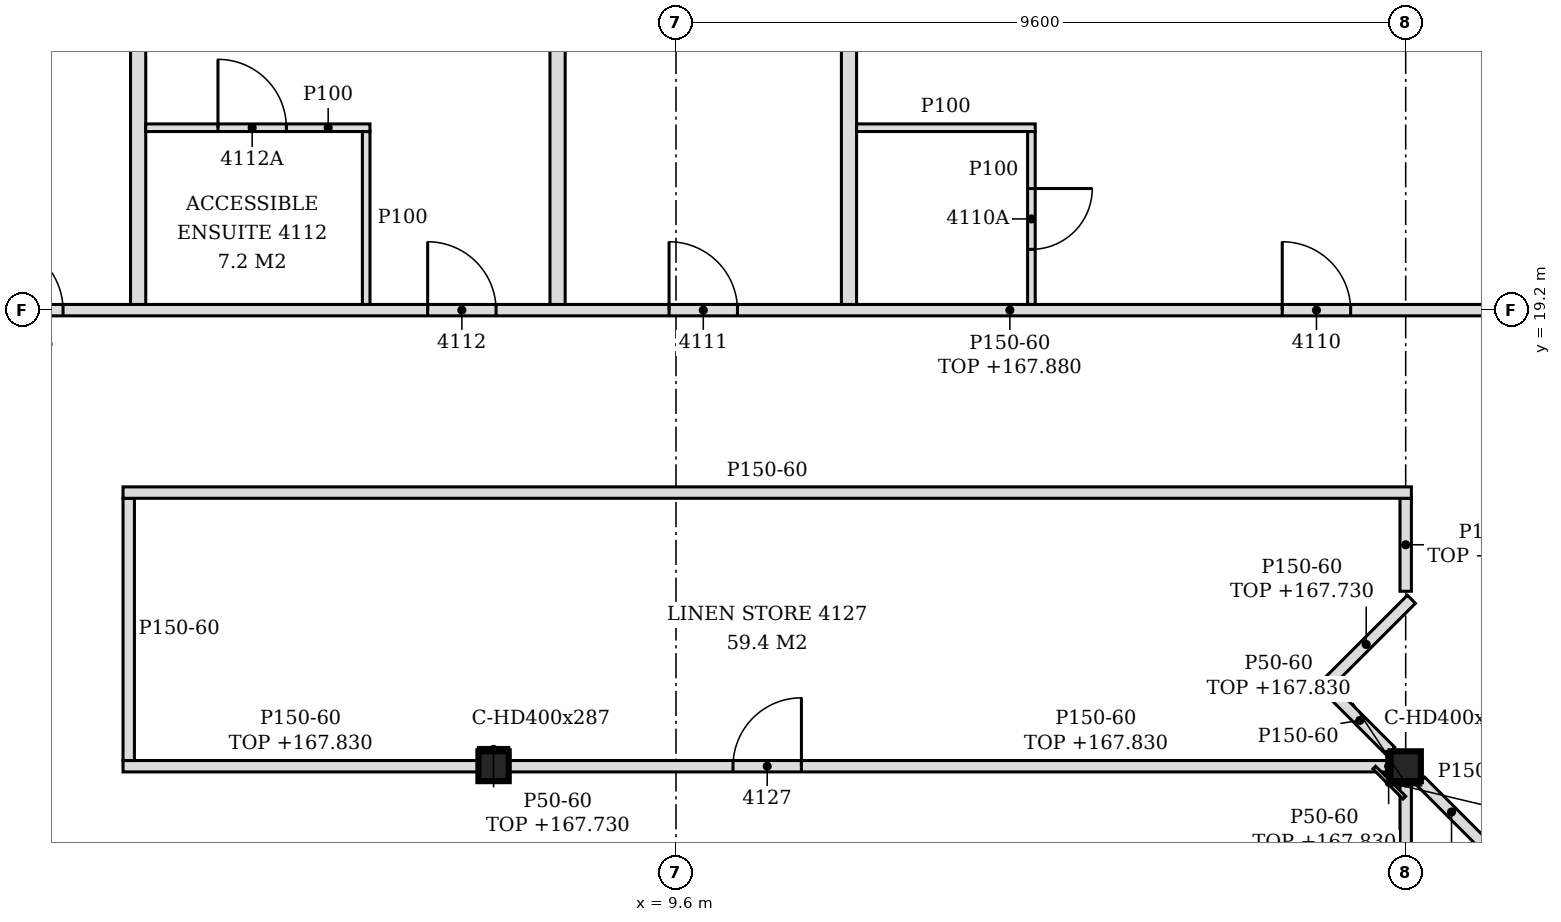
"""IFC4 building model, lengths in metres.
Left out: names, types, materials, properties, quantities, classifications, styles, units other than length and angle.
Written with IfcOpenShell. Run it as: python <this file> out.ifc"""

import sys

from ifc_helpers import new_model, si_unit, direction, frame, frame_2d, origin, origin_2d, place, context, subcontext, project, spatial, polyline, rectangle, i_section, outline, extrude, element, fill, save


model = new_model("IFC4")
c1 = context("Model", 3, precision=1e-05, world=origin(), true_north=direction((0.0, 1.0)))
c2 = subcontext(c1, "Body", "Model", "MODEL_VIEW")
j1 = project(units=[si_unit("LENGTHUNIT", "METRE"), si_unit("PLANEANGLEUNIT", "RADIAN")], contexts=[c1])
p1 = place(None, origin())
s1 = spatial("IfcSite", under=j1, at=p1, CompositionType="ELEMENT")
p2 = place(p1, origin())
s2 = spatial("IfcBuilding", under=s1, at=p2, CompositionType="ELEMENT")
p3 = place(p2, frame((0.0, 0.0, 165.0)))
s3 = spatial("IfcBuildingStorey", under=s2, at=p3, CompositionType="ELEMENT", Elevation=165.0)
for number, where, z_axis, x_axis in (
    (1, (7.2, 13.2, -0.15), (0.0, 0.0, 1.0), (1.0, 0.0, 0.0)),
    (2, (19.2, 13.2, -0.15), (0.0, 0.0, 1.0), (1.0, 0.0, 0.0)),
):
    element("IfcColumn", number, at=place(p3, frame(where, z_axis=z_axis, x_axis=x_axis)), inside=s3, PredefinedType="COLUMN", context=c2, shape_type="SweptSolid", body=[
        extrude(i_section(OverallWidth=0.399, OverallDepth=0.393, WebThickness=0.023, FlangeThickness=0.037, FilletRadius=0.015, at=origin_2d()), origin(), (0.0, 0.0, 1.0), 3.6),
    ])
p4 = place(p3, frame((19.2, 2.596, 0.0), z_axis=(0.0, 0.0, 1.0), x_axis=(0.0, 1.0, 0.0)))
e3 = element("IfcWall", 3, at=p4, inside=s3, PredefinedType="PARTITIONING", context=c2, shape_type="SweptSolid", body=[
    extrude(rectangle(XDim=10.407, YDim=0.15, at=frame_2d((5.204, 0.0))), origin(), (0.0, 0.0, 1.0), 2.83),
])
p5 = place(p4, frame((0.553, 0.0, 0.0)))
e4 = element("IfcOpeningElement", 4, at=p5, cuts=e3, PredefinedType="OPENING", context=c2, shape_type="SweptSolid", body=[
    extrude(rectangle(XDim=0.9, YDim=2.1, at=frame_2d((0.45, 1.05))), frame((0.0, 0.085, 0.0), z_axis=(0.0, -1.0, 0.0), x_axis=(1.0, 0.0, 0.0)), (0.0, 0.0, 1.0), 0.17),
])
p6 = place(p3, frame((20.208, 12.086, 0.0), z_axis=(0.0, 0.0, 1.0), x_axis=(0.706756381459, 0.707457007363, 0.0)))
e5 = element("IfcWall", 5, at=p6, inside=s3, PredefinedType="PARTITIONING", context=c2, shape_type="SweptSolid", body=[
    extrude(rectangle(XDim=1.394, YDim=0.15, at=frame_2d((0.697, 0.0))), origin(), (0.0, 0.0, 1.0), 3.45),
])
p7 = place(p3, frame((20.208, 12.192, 0.0), z_axis=(0.0, 0.0, 1.0), x_axis=(-0.70721334539, 0.707000200921, 0.0)))
e6 = element("IfcWall", 6, at=p7, inside=s3, PredefinedType="PARTITIONING", context=c2, shape_type="SweptSolid", body=[
    extrude(rectangle(XDim=1.146, YDim=0.15, at=frame_2d((0.573, 0.0))), origin(), (0.0, 0.0, 1.0), 3.45),
])
p8 = place(p3, frame((2.325, 13.2, 0.0), z_axis=(0.0, 0.0, 1.0), x_axis=(1.0, 0.0, 0.0)))
e7 = element("IfcWall", 7, at=p8, inside=s3, PredefinedType="PARTITIONING", context=c2, shape_type="SweptSolid", body=[
    extrude(rectangle(XDim=4.676, YDim=0.15, at=frame_2d((2.338, 0.0))), origin(), (0.0, 0.0, 1.0), 2.83),
])
p9 = place(p3, frame((7.399, 13.2, 0.0), z_axis=(0.0, 0.0, 1.0), x_axis=(1.0, 0.0, 0.0)))
e8 = element("IfcWall", 8, at=p9, inside=s3, PredefinedType="PARTITIONING", context=c2, shape_type="SweptSolid", body=[
    extrude(rectangle(XDim=11.601, YDim=0.15, at=frame_2d((5.801, 0.0))), origin(), (0.0, 0.0, 1.0), 2.83),
])
p10 = place(p9, frame((2.95, 0.0, 0.0)))
e9 = element("IfcOpeningElement", 9, at=p10, cuts=e8, PredefinedType="OPENING", context=c2, shape_type="SweptSolid", body=[
    extrude(rectangle(XDim=0.9, YDim=2.1, at=frame_2d((0.45, 1.05))), frame((0.0, 0.085, 0.0), z_axis=(0.0, -1.0, 0.0), x_axis=(1.0, 0.0, 0.0)), (0.0, 0.0, 1.0), 0.17),
])
p11 = place(p3, frame((2.4, 13.275, 0.0), z_axis=(0.0, 0.0, 1.0), x_axis=(0.0, 1.0, 0.0)))
e10 = element("IfcWall", 10, at=p11, inside=s3, PredefinedType="PARTITIONING", context=c2, shape_type="SweptSolid", body=[
    extrude(outline(polyline([(0.0, 0.0), (3.45, 0.0), (3.45, 3.45), (0.075, 3.45), (0.073, 2.83), (0.0, 2.83), (0.0, 0.0)])), frame((0.0, 0.075, 0.0), z_axis=(0.0, -1.0, 0.0), x_axis=(1.0, 0.0, 0.0)), (0.0, 0.0, 1.0), 0.15),
])
p12 = place(p3, frame((19.002, 13.398, 0.0), z_axis=(0.0, 0.0, 1.0), x_axis=(-0.707000200921, 0.70721334539, 0.0)))
e11 = element("IfcWall", 11, at=p12, inside=s3, PredefinedType="PARTITIONING", context=c2, shape_type="SweptSolid", body=[
    extrude(rectangle(XDim=1.146, YDim=0.15, at=frame_2d((0.573, 0.0))), origin(), (0.0, 0.0, 1.0), 3.45),
])
p13 = place(p3, frame((18.086, 14.208, 0.0), z_axis=(0.0, 0.0, 1.0), x_axis=(0.70739723372, 0.706816209298, 0.0)))
e12 = element("IfcWall", 12, at=p13, inside=s3, PredefinedType="PARTITIONING", context=c2, shape_type="SweptSolid", body=[
    extrude(rectangle(XDim=1.681, YDim=0.15, at=frame_2d((0.84, 0.0))), origin(), (0.0, 0.0, 1.0), 2.73),
])
p14 = place(p3, frame((19.2, 15.502, 0.0), z_axis=(0.0, 0.0, 1.0), x_axis=(0.0, 1.0, 0.0)))
e13 = element("IfcWall", 13, at=p14, inside=s3, PredefinedType="PARTITIONING", context=c2, shape_type="SweptSolid", body=[
    extrude(rectangle(XDim=1.223, YDim=0.15, at=frame_2d((0.612, 0.0))), origin(), (0.0, 0.0, 1.0), 2.73),
])
p15 = place(p3, frame((2.325, 16.8, 0.0), z_axis=(0.0, 0.0, 1.0), x_axis=(1.0, 0.0, 0.0)))
e14 = element("IfcWall", 14, at=p15, inside=s3, PredefinedType="PARTITIONING", context=c2, shape_type="SweptSolid", body=[
    extrude(outline(polyline([(0.0, 0.0), (16.95, 0.0), (16.95, 2.73), (16.725, 2.73), (16.723, 3.45), (5.025, 3.45), (5.023, 2.73), (4.725, 2.73), (4.723, 3.45), (0.0, 3.45), (0.0, 0.0)])), frame((0.0, 0.075, 0.0), z_axis=(0.0, -1.0, 0.0), x_axis=(1.0, 0.0, 0.0)), (0.0, 0.0, 1.0), 0.15),
])
p16 = place(p3, frame((-8.421, 19.2, 0.0), z_axis=(0.0, 0.0, 1.0), x_axis=(1.0, 0.0, 0.0)))
e15 = element("IfcWall", 15, at=p16, inside=s3, PredefinedType="PARTITIONING", context=c2, shape_type="SweptSolid", body=[
    extrude(outline(polyline([(0.0, 0.0), (31.242, 0.0), (31.242, 2.88), (27.771, 2.88), (27.769, 2.73), (27.471, 2.73), (27.469, 2.88), (15.771, 2.88), (15.769, 2.73), (15.471, 2.73), (15.469, 2.88), (3.771, 2.88), (3.769, 2.73), (3.471, 2.73), (3.469, 2.88), (0.0, 2.88), (0.0, 0.0)])), frame((0.0, 0.075, 0.0), z_axis=(0.0, -1.0, 0.0), x_axis=(1.0, 0.0, 0.0)), (0.0, 0.0, 1.0), 0.15),
])
p17 = place(p16, frame((25.997, 0.0, 0.0)))
e16 = element("IfcOpeningElement", 16, at=p17, cuts=e15, PredefinedType="OPENING", context=c2, shape_type="SweptSolid", body=[
    extrude(rectangle(XDim=0.9, YDim=2.1, at=frame_2d((0.45, 1.05))), frame((0.0, 0.085, 0.0), z_axis=(0.0, -1.0, 0.0), x_axis=(1.0, 0.0, 0.0)), (0.0, 0.0, 1.0), 0.17),
])
p18 = place(p16, frame((17.93, 0.0, 0.0)))
e17 = element("IfcOpeningElement", 17, at=p18, cuts=e15, PredefinedType="OPENING", context=c2, shape_type="SweptSolid", body=[
    extrude(rectangle(XDim=0.9, YDim=2.1, at=frame_2d((0.45, 1.05))), frame((0.0, 0.085, 0.0), z_axis=(0.0, -1.0, 0.0), x_axis=(1.0, 0.0, 0.0)), (0.0, 0.0, 1.0), 0.17),
])
p19 = place(p16, frame((14.754, 0.0, 0.0)))
e18 = element("IfcOpeningElement", 18, at=p19, cuts=e15, PredefinedType="OPENING", context=c2, shape_type="SweptSolid", body=[
    extrude(rectangle(XDim=0.9, YDim=2.1, at=frame_2d((0.45, 1.05))), frame((0.0, 0.085, 0.0), z_axis=(0.0, -1.0, 0.0), x_axis=(1.0, 0.0, 0.0)), (0.0, 0.0, 1.0), 0.17),
])
p20 = place(p16, frame((9.057, 0.0, 0.0)))
e19 = element("IfcOpeningElement", 19, at=p20, cuts=e15, PredefinedType="OPENING", context=c2, shape_type="SweptSolid", body=[
    extrude(rectangle(XDim=0.9, YDim=2.1, at=frame_2d((0.45, 1.05))), frame((0.0, 0.085, 0.0), z_axis=(0.0, -1.0, 0.0), x_axis=(1.0, 0.0, 0.0)), (0.0, 0.0, 1.0), 0.17),
])
p21 = place(p16, frame((2.907, 0.0, 0.0)))
e20 = element("IfcOpeningElement", 20, at=p21, cuts=e15, PredefinedType="OPENING", context=c2, shape_type="SweptSolid", body=[
    extrude(rectangle(XDim=0.9, YDim=2.1, at=frame_2d((0.45, 1.05))), frame((0.0, 0.085, 0.0), z_axis=(0.0, -1.0, 0.0), x_axis=(1.0, 0.0, 0.0)), (0.0, 0.0, 1.0), 0.17),
])
p22 = place(p3, frame((2.524, 19.275, 0.0), z_axis=(0.0, 0.0, 1.0), x_axis=(0.0, 1.0, 0.0)))
e21 = element("IfcWall", 21, at=p22, inside=s3, PredefinedType="PARTITIONING", context=c2, shape_type="SweptSolid", body=[
    extrude(outline(polyline([(0.0, 0.0), (8.325, 0.0), (8.325, 3.45), (4.83, 3.45), (4.828, 2.88), (4.62, 2.88), (4.618, 3.45), (0.03, 3.45), (0.028, 2.88), (0.0, 2.88), (0.0, 0.0)])), frame((0.0, 0.1, 0.0), z_axis=(0.0, -1.0, 0.0), x_axis=(1.0, 0.0, 0.0)), (0.0, 0.0, 1.0), 0.2),
])
p23 = place(p3, frame((5.524, 19.275, 0.0), z_axis=(0.0, 0.0, 1.0), x_axis=(0.0, 1.0, 0.0)))
e22 = element("IfcWall", 22, at=p23, inside=s3, PredefinedType="PARTITIONING", context=c2, shape_type="SweptSolid", body=[
    extrude(outline(polyline([(0.0, 0.0), (2.275, 0.0), (2.275, 3.45), (0.03, 3.45), (0.028, 2.88), (0.0, 2.88), (0.0, 0.0)])), frame((0.0, 0.05, 0.0), z_axis=(0.0, -1.0, 0.0), x_axis=(1.0, 0.0, 0.0)), (0.0, 0.0, 1.0), 0.1),
])
p24 = place(p3, frame((8.042, 19.275, 0.0), z_axis=(0.0, 0.0, 1.0), x_axis=(0.0, 1.0, 0.0)))
e23 = element("IfcWall", 23, at=p24, inside=s3, PredefinedType="PARTITIONING", context=c2, shape_type="SweptSolid", body=[
    extrude(outline(polyline([(0.0, 0.0), (9.145, 0.0), (9.145, 3.45), (8.775, 3.45), (8.773, 2.93), (8.475, 2.93), (8.473, 3.45), (4.83, 3.45), (4.828, 2.88), (4.62, 2.88), (4.618, 3.45), (0.03, 3.45), (0.028, 2.88), (0.0, 2.88), (0.0, 0.0)])), frame((0.0, 0.1, 0.0), z_axis=(0.0, -1.0, 0.0), x_axis=(1.0, 0.0, 0.0)), (0.0, 0.0, 1.0), 0.2),
])
p25 = place(p3, frame((11.876, 19.275, 0.0), z_axis=(0.0, 0.0, 1.0), x_axis=(0.0, 1.0, 0.0)))
e24 = element("IfcWall", 24, at=p25, inside=s3, PredefinedType="PARTITIONING", context=c2, shape_type="SweptSolid", body=[
    extrude(outline(polyline([(0.0, 0.0), (8.325, 0.0), (8.325, 3.45), (4.83, 3.45), (4.828, 2.88), (4.62, 2.88), (4.618, 3.45), (0.03, 3.45), (0.028, 2.88), (0.0, 2.88), (0.0, 0.0)])), frame((0.0, 0.1, 0.0), z_axis=(0.0, -1.0, 0.0), x_axis=(1.0, 0.0, 0.0)), (0.0, 0.0, 1.0), 0.2),
])
p26 = place(p3, frame((14.276, 19.275, 0.0), z_axis=(0.0, 0.0, 1.0), x_axis=(0.0, 1.0, 0.0)))
e25 = element("IfcWall", 25, at=p26, inside=s3, PredefinedType="PARTITIONING", context=c2, shape_type="SweptSolid", body=[
    extrude(outline(polyline([(0.0, 0.0), (2.275, 0.0), (2.275, 3.45), (0.03, 3.45), (0.028, 2.88), (0.0, 2.88), (0.0, 0.0)])), frame((0.0, 0.05, 0.0), z_axis=(0.0, -1.0, 0.0), x_axis=(1.0, 0.0, 0.0)), (0.0, 0.0, 1.0), 0.1),
])
p27 = place(p26, frame((0.725, 0.0, 0.0)))
e26 = element("IfcOpeningElement", 26, at=p27, cuts=e25, PredefinedType="OPENING", context=c2, shape_type="SweptSolid", body=[
    extrude(rectangle(XDim=0.8, YDim=2.1, at=frame_2d((0.4, 1.05))), frame((0.0, 0.06, 0.0), z_axis=(0.0, -1.0, 0.0), x_axis=(1.0, 0.0, 0.0)), (0.0, 0.0, 1.0), 0.12),
])
p28 = place(p3, frame((2.624, 21.6, 0.0), z_axis=(0.0, 0.0, 1.0), x_axis=(1.0, 0.0, 0.0)))
e27 = element("IfcWall", 27, at=p28, inside=s3, PredefinedType="PARTITIONING", context=c2, shape_type="SweptSolid", body=[
    extrude(rectangle(XDim=2.95, YDim=0.1, at=frame_2d((1.475, 0.0))), origin(), (0.0, 0.0, 1.0), 3.45),
])
p29 = place(p28, frame((0.95, 0.0, 0.0)))
e28 = element("IfcOpeningElement", 28, at=p29, cuts=e27, PredefinedType="OPENING", context=c2, shape_type="SweptSolid", body=[
    extrude(rectangle(XDim=0.9, YDim=2.1, at=frame_2d((0.45, 1.05))), frame((0.0, 0.06, 0.0), z_axis=(0.0, -1.0, 0.0), x_axis=(1.0, 0.0, 0.0)), (0.0, 0.0, 1.0), 0.12),
])
p30 = place(p3, frame((11.976, 21.6, 0.0), z_axis=(0.0, 0.0, 1.0), x_axis=(1.0, 0.0, 0.0)))
e29 = element("IfcWall", 29, at=p30, inside=s3, PredefinedType="PARTITIONING", context=c2, shape_type="SweptSolid", body=[
    extrude(rectangle(XDim=2.35, YDim=0.1, at=frame_2d((1.175, 0.0))), origin(), (0.0, 0.0, 1.0), 3.45),
])
p31 = place(p3, frame((18.976, 13.003, 0.0), z_axis=(0.0, 0.0, 1.0), x_axis=(0.0, 1.0, 0.0)))
e30 = element("IfcWall", 30, at=p31, inside=s3, PredefinedType="PARTITIONING", context=c2, shape_type="SweptSolid", body=[
    extrude(rectangle(XDim=0.393, YDim=0.05, at=frame_2d((0.197, 0.0))), origin(), (0.0, 0.0, 1.0), 2.83),
])
p32 = place(p3, frame((19.182, 12.786, 0.0), z_axis=(0.0, 0.0, 1.0), x_axis=(-0.707106781187, 0.707106781187, 0.0)))
e31 = element("IfcWall", 31, at=p32, inside=s3, PredefinedType="PARTITIONING", context=c2, shape_type="SweptSolid", body=[
    extrude(rectangle(XDim=0.56, YDim=0.05, at=frame_2d((0.28, 0.0))), origin(), (0.0, 0.0, 1.0), 2.83),
])
p33 = place(p3, frame((7.0, 13.421, 0.0), z_axis=(0.0, 0.0, 1.0), x_axis=(1.0, 0.0, 0.0)))
e32 = element("IfcWall", 32, at=p33, inside=s3, PredefinedType="PARTITIONING", context=c2, shape_type="SweptSolid", body=[
    extrude(rectangle(XDim=0.399, YDim=0.05, at=frame_2d((0.199, 0.0))), origin(), (0.0, 0.0, 1.0), 2.73),
])
p34 = place(p3, frame((19.0, 12.979, 0.0), z_axis=(0.0, 0.0, 1.0), x_axis=(1.0, 0.0, 0.0)))
e33 = element("IfcWall", 33, at=p34, inside=s3, PredefinedType="PARTITIONING", context=c2, shape_type="SweptSolid", body=[
    extrude(rectangle(XDim=0.399, YDim=0.05, at=frame_2d((0.199, 0.0))), origin(), (0.0, 0.0, 1.0), 2.83),
])
p35 = place(p17, origin())
e34 = element("IfcDoor", 34, at=p35, inside=s3, OperationType="SINGLE_SWING_LEFT", PredefinedType="DOOR", context=c2, shape_type="SweptSolid", body=[
    extrude(rectangle(XDim=0.9, YDim=2.1, at=frame_2d((0.45, 1.05))), frame((0.0, 0.025, 0.0), z_axis=(0.0, -1.0, 0.0), x_axis=(1.0, 0.0, 0.0)), (0.0, 0.0, 1.0), 0.05),
])
fill(e16, e34)
p36 = place(p27, frame((0.8, 0.0, 0.0), z_axis=(0.0, 0.0, 1.0), x_axis=(-1.0, 0.0, 0.0)))
e35 = element("IfcDoor", 35, at=p36, inside=s3, OperationType="SINGLE_SWING_LEFT", PredefinedType="DOOR", context=c2, shape_type="SweptSolid", body=[
    extrude(rectangle(XDim=0.8, YDim=2.1, at=frame_2d((0.4, 1.05))), frame((0.0, 0.025, 0.0), z_axis=(0.0, -1.0, 0.0), x_axis=(1.0, 0.0, 0.0)), (0.0, 0.0, 1.0), 0.05),
])
fill(e26, e35)
p37 = place(p18, origin())
e36 = element("IfcDoor", 36, at=p37, inside=s3, OperationType="SINGLE_SWING_LEFT", PredefinedType="DOOR", context=c2, shape_type="SweptSolid", body=[
    extrude(rectangle(XDim=0.9, YDim=2.1, at=frame_2d((0.45, 1.05))), frame((0.0, 0.025, 0.0), z_axis=(0.0, -1.0, 0.0), x_axis=(1.0, 0.0, 0.0)), (0.0, 0.0, 1.0), 0.05),
])
fill(e17, e36)
p38 = place(p19, origin())
e37 = element("IfcDoor", 37, at=p38, inside=s3, OperationType="SINGLE_SWING_LEFT", PredefinedType="DOOR", context=c2, shape_type="SweptSolid", body=[
    extrude(rectangle(XDim=0.9, YDim=2.1, at=frame_2d((0.45, 1.05))), frame((0.0, 0.025, 0.0), z_axis=(0.0, -1.0, 0.0), x_axis=(1.0, 0.0, 0.0)), (0.0, 0.0, 1.0), 0.05),
])
fill(e18, e37)
p39 = place(p29, origin())
e38 = element("IfcDoor", 38, at=p39, inside=s3, OperationType="SINGLE_SWING_LEFT", PredefinedType="DOOR", context=c2, shape_type="SweptSolid", body=[
    extrude(rectangle(XDim=0.9, YDim=2.1, at=frame_2d((0.45, 1.05))), frame((0.0, 0.025, 0.0), z_axis=(0.0, -1.0, 0.0), x_axis=(1.0, 0.0, 0.0)), (0.0, 0.0, 1.0), 0.05),
])
fill(e28, e38)
p40 = place(p20, origin())
e39 = element("IfcDoor", 39, at=p40, inside=s3, OperationType="SINGLE_SWING_LEFT", PredefinedType="DOOR", context=c2, shape_type="SweptSolid", body=[
    extrude(rectangle(XDim=0.9, YDim=2.1, at=frame_2d((0.45, 1.05))), frame((0.0, 0.025, 0.0), z_axis=(0.0, -1.0, 0.0), x_axis=(1.0, 0.0, 0.0)), (0.0, 0.0, 1.0), 0.05),
])
fill(e19, e39)
p41 = place(p10, origin())
e40 = element("IfcDoor", 40, at=p41, inside=s3, OperationType="SINGLE_SWING_RIGHT", PredefinedType="DOOR", context=c2, shape_type="SweptSolid", body=[
    extrude(rectangle(XDim=0.9, YDim=2.1, at=frame_2d((0.45, 1.05))), frame((0.0, 0.025, 0.0), z_axis=(0.0, -1.0, 0.0), x_axis=(1.0, 0.0, 0.0)), (0.0, 0.0, 1.0), 0.05),
])
fill(e9, e40)
save(model, sys.argv[1])
